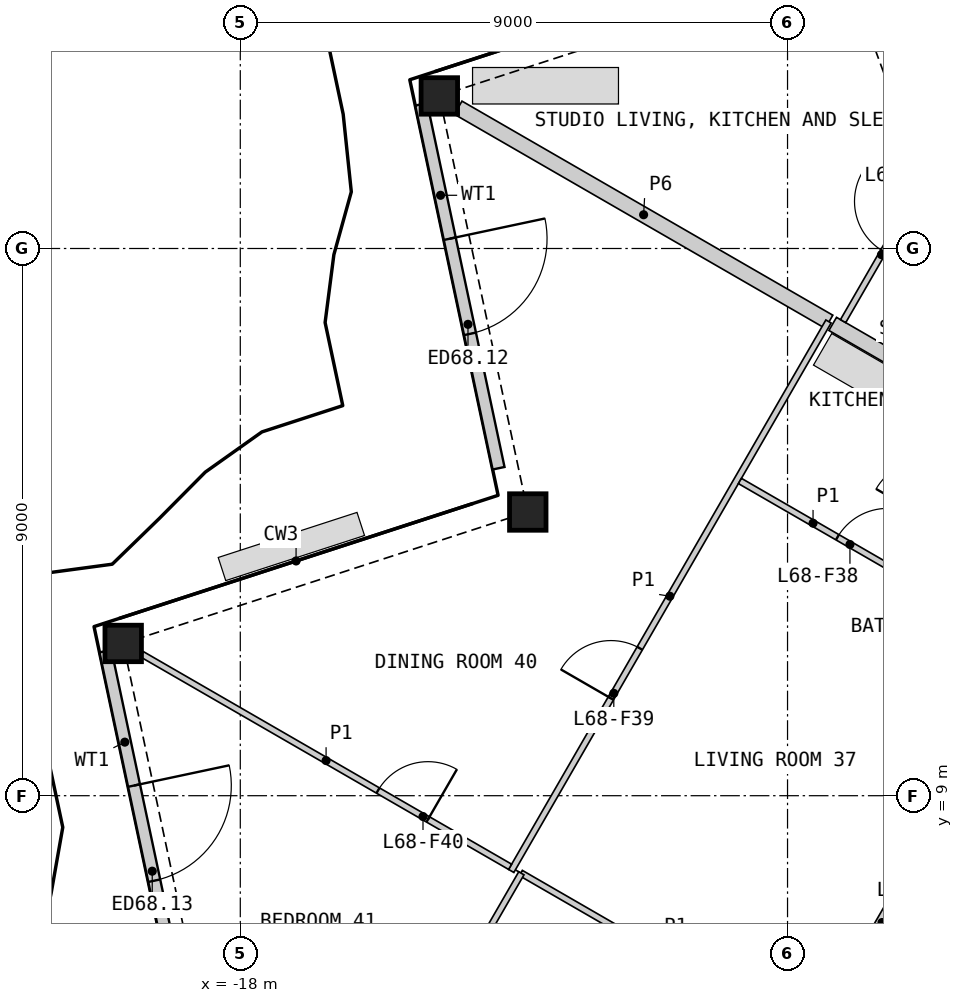
"""IFC4 building model, lengths in metres.
Left out: names, types, materials, properties, quantities, classifications, styles, units other than length and angle.
Written with IfcOpenShell. Run it as: python <this file> out.ifc"""

import sys

from ifc_helpers import new_model, si_unit, direction, frame, frame_2d, origin, origin_2d, place, context, subcontext, project, spatial, rectangle, hollow_rectangle, extrude, element, fill, save


model = new_model("IFC4")
c1 = context("Model", 3, precision=1e-05, world=origin(), true_north=direction((0.0, 1.0)))
c2 = subcontext(c1, "Body", "Model", "MODEL_VIEW")
j1 = project(units=[si_unit("LENGTHUNIT", "METRE"), si_unit("PLANEANGLEUNIT", "RADIAN")], contexts=[c1])
p1 = place(None, origin())
s1 = spatial("IfcSite", under=j1, at=p1, CompositionType="ELEMENT")
p2 = place(p1, origin())
s2 = spatial("IfcBuilding", under=s1, at=p2, CompositionType="ELEMENT")
p3 = place(p2, frame((0.0, 0.0, 312.0)))
s3 = spatial("IfcBuildingStorey", under=s2, at=p3, CompositionType="ELEMENT", Elevation=312.0)
for number, where, z_axis, x_axis in (
    (1, (-14.727, 20.509, 0.0), (0.0, 0.0, 1.0), (1.0, 0.0, 0.0)),
    (2, (-13.272, 13.666, 0.0), (0.0, 0.0, 1.0), (1.0, 0.0, 0.0)),
    (3, (-19.926, 11.504, 0.0), (0.0, 0.0, 1.0), (1.0, 0.0, 0.0)),
):
    element("IfcColumn", number, at=place(p3, frame(where, z_axis=z_axis, x_axis=x_axis)), inside=s3, PredefinedType="COLUMN", context=c2, shape_type="SweptSolid", body=[
        extrude(hollow_rectangle(XDim=0.6, YDim=0.6, WallThickness=0.04, at=origin_2d()), origin(), (0.0, 0.0, 1.0), 3.4),
    ])
p4 = place(p3, frame((-15.025, 20.372, 0.0), z_axis=(0.0, 0.0, 1.0), x_axis=(0.207932234858, -0.978143233738, 0.0)))
e4 = element("IfcWall", 4, at=p4, inside=s3, PredefinedType="SOLIDWALL", context=c2, shape_type="SweptSolid", body=[
    extrude(rectangle(XDim=6.12, YDim=0.2, at=frame_2d((3.06, 0.0))), origin(), (0.0, 0.0, 1.0), 2.488),
])
p5 = place(p4, frame((2.26, 0.0, 0.0)))
e5 = element("IfcOpeningElement", 5, at=p5, cuts=e4, PredefinedType="OPENING", context=c2, shape_type="SweptSolid", body=[
    extrude(rectangle(XDim=1.6, YDim=2.25, at=frame_2d((0.8, 1.125))), frame((0.0, 0.11, 0.0), z_axis=(0.0, -1.0, 0.0), x_axis=(1.0, 0.0, 0.0)), (0.0, 0.0, 1.0), 0.22),
])
p6 = place(p3, frame((-20.217, 11.377, 0.0), z_axis=(0.0, 0.0, 1.0), x_axis=(0.207885951908, -0.978153071354, 0.0)))
e6 = element("IfcWall", 6, at=p6, inside=s3, PredefinedType="SOLIDWALL", context=c2, shape_type="SweptSolid", body=[
    extrude(rectangle(XDim=6.12, YDim=0.2, at=frame_2d((3.06, 0.0))), origin(), (0.0, 0.0, 1.0), 2.488),
])
p7 = place(p6, frame((2.26, 0.0, 0.0)))
e7 = element("IfcOpeningElement", 7, at=p7, cuts=e6, PredefinedType="OPENING", context=c2, shape_type="SweptSolid", body=[
    extrude(rectangle(XDim=1.6, YDim=2.25, at=frame_2d((0.8, 1.125))), frame((0.0, 0.11, 0.0), z_axis=(0.0, -1.0, 0.0), x_axis=(1.0, 0.0, 0.0)), (0.0, 0.0, 1.0), 0.22),
])
p8 = place(p3, frame((-3.461, 8.417, 0.0), z_axis=(0.0, 0.0, 1.0), x_axis=(-0.50000391502, -0.866023143435, 0.0)))
e8 = element("IfcWall", 8, at=p8, inside=s3, PredefinedType="SHEAR", context=c2, shape_type="SweptSolid", body=[
    extrude(rectangle(XDim=7.759, YDim=0.6, at=frame_2d((3.879, 0.0))), origin(), (0.0, 0.0, 1.0), 3.1),
])
p9 = place(p3, frame((-8.458, 5.16, 0.0), z_axis=(0.0, 0.0, 1.0), x_axis=(0.499984266882, 0.866034487114, 0.0)))
e9 = element("IfcWall", 9, at=p9, inside=s3, PredefinedType="PARTITIONING", context=c2, shape_type="SweptSolid", body=[
    extrude(rectangle(XDim=8.099, YDim=0.2, at=frame_2d((4.049, 0.0))), origin(), (0.0, 0.0, 1.0), 3.1),
])
p10 = place(p9, frame((3.093, 0.0, 0.0)))
e10 = element("IfcOpeningElement", 10, at=p10, cuts=e9, PredefinedType="OPENING", context=c2, shape_type="SweptSolid", body=[
    extrude(rectangle(XDim=1.0, YDim=2.1, at=frame_2d((0.5, 1.05))), frame((0.0, 0.11, 0.0), z_axis=(0.0, -1.0, 0.0), x_axis=(1.0, 0.0, 0.0)), (0.0, 0.0, 1.0), 0.22),
])
p11 = place(p3, frame((-14.417, 20.316, 0.0), z_axis=(0.0, 0.0, 1.0), x_axis=(0.866022207469, -0.50000553614, 0.0)))
e11 = element("IfcWall", 11, at=p11, inside=s3, PredefinedType="PARTITIONING", context=c2, shape_type="SweptSolid", body=[
    extrude(rectangle(XDim=7.042, YDim=0.25, at=frame_2d((3.521, 0.0))), origin(), (0.0, 0.0, 1.0), 2.33),
])
p12 = place(p3, frame((-8.257, 16.76, 0.0), z_axis=(0.0, 0.0, 1.0), x_axis=(0.866034739526, -0.499983829672, 0.0)))
e12 = element("IfcWall", 12, at=p12, inside=s3, PredefinedType="PARTITIONING", context=c2, shape_type="SweptSolid", body=[
    extrude(rectangle(XDim=5.525, YDim=0.25, at=frame_2d((2.763, 0.0))), origin(), (0.0, 0.0, 1.0), 2.33),
])
p13 = place(p3, frame((-9.669, 29.144, 0.0), z_axis=(0.0, 0.0, 1.0), x_axis=(0.517770554559, -0.85551952218, 0.0)))
e13 = element("IfcWall", 13, at=p13, inside=s3, PredefinedType="PARTITIONING", context=c2, shape_type="SweptSolid", body=[
    extrude(rectangle(XDim=14.784, YDim=0.2, at=frame_2d((7.392, 0.0))), origin(), (0.0, 0.0, 1.0), 2.33),
])
p14 = place(p3, frame((-13.544, 7.762, 0.0), z_axis=(0.0, 0.0, 1.0), x_axis=(0.499993819111, 0.866028972293, 0.0)))
e14 = element("IfcWall", 14, at=p14, inside=s3, PredefinedType="PARTITIONING", context=c2, shape_type="SweptSolid", body=[
    extrude(rectangle(XDim=10.436, YDim=0.1, at=frame_2d((5.218, 0.0))), origin(), (0.0, 0.0, 1.0), 2.33),
])
p15 = place(p14, frame((3.279, 0.0, 0.0)))
e15 = element("IfcOpeningElement", 15, at=p15, cuts=e14, PredefinedType="OPENING", context=c2, shape_type="SweptSolid", body=[
    extrude(rectangle(XDim=0.95, YDim=2.1, at=frame_2d((0.475, 1.05))), frame((0.0, 0.06, 0.0), z_axis=(0.0, -1.0, 0.0), x_axis=(1.0, 0.0, 0.0)), (0.0, 0.0, 1.0), 0.12),
])
p16 = place(p3, frame((-19.615, 11.325, 0.0), z_axis=(0.0, 0.0, 1.0), x_axis=(0.866013987544, -0.500019772988, 0.0)))
e16 = element("IfcWall", 16, at=p16, inside=s3, PredefinedType="PARTITIONING", context=c2, shape_type="SweptSolid", body=[
    extrude(rectangle(XDim=6.99, YDim=0.1, at=frame_2d((3.495, 0.0))), origin(), (0.0, 0.0, 1.0), 2.33),
])
p17 = place(p16, frame((4.48, 0.0, 0.0)))
e17 = element("IfcOpeningElement", 17, at=p17, cuts=e16, PredefinedType="OPENING", context=c2, shape_type="SweptSolid", body=[
    extrude(rectangle(XDim=0.95, YDim=2.1, at=frame_2d((0.475, 1.05))), frame((0.0, 0.06, 0.0), z_axis=(0.0, -1.0, 0.0), x_axis=(1.0, 0.0, 0.0)), (0.0, 0.0, 1.0), 0.12),
])
p18 = place(p3, frame((-9.783, 14.177, 0.0), z_axis=(0.0, 0.0, 1.0), x_axis=(0.866030435321, -0.499991285022, 0.0)))
e18 = element("IfcWall", 18, at=p18, inside=s3, PredefinedType="PARTITIONING", context=c2, shape_type="SweptSolid", body=[
    extrude(rectangle(XDim=5.555, YDim=0.1, at=frame_2d((2.778, 0.0))), origin(), (0.0, 0.0, 1.0), 2.33),
])
p19 = place(p18, frame((1.852, 0.0, 0.0)))
e19 = element("IfcOpeningElement", 19, at=p19, cuts=e18, PredefinedType="OPENING", context=c2, shape_type="SweptSolid", body=[
    extrude(rectangle(XDim=0.95, YDim=2.1, at=frame_2d((0.475, 1.05))), frame((0.0, 0.06, 0.0), z_axis=(0.0, -1.0, 0.0), x_axis=(1.0, 0.0, 0.0)), (0.0, 0.0, 1.0), 0.12),
])
p20 = place(p3, frame((-13.386, 7.729, 0.0), z_axis=(0.0, 0.0, 1.0), x_axis=(0.866034036823, -0.49998504684, 0.0)))
e20 = element("IfcWall", 20, at=p20, inside=s3, PredefinedType="PARTITIONING", context=c2, shape_type="SweptSolid", body=[
    extrude(rectangle(XDim=5.312, YDim=0.1, at=frame_2d((2.656, 0.0))), origin(), (0.0, 0.0, 1.0), 2.33),
])
p21 = place(p3, frame((-15.912, 3.335, 0.0), z_axis=(0.0, 0.0, 1.0), x_axis=(0.49999906822, 0.866025941747, 0.0)))
e21 = element("IfcWall", 21, at=p21, inside=s3, PredefinedType="PARTITIONING", context=c2, shape_type="SweptSolid", body=[
    extrude(rectangle(XDim=5.068, YDim=0.1, at=frame_2d((2.534, 0.0))), origin(), (0.0, 0.0, 1.0), 2.33),
])
p22 = place(p21, frame((1.757, 0.0, 0.0)))
e22 = element("IfcOpeningElement", 22, at=p22, cuts=e21, PredefinedType="OPENING", context=c2, shape_type="SweptSolid", body=[
    extrude(rectangle(XDim=0.95, YDim=2.1, at=frame_2d((0.475, 1.05))), frame((0.0, 0.06, 0.0), z_axis=(0.0, -1.0, 0.0), x_axis=(1.0, 0.0, 0.0)), (0.0, 0.0, 1.0), 0.12),
])
p23 = place(p3, frame((-8.086, 16.805, 0.0), z_axis=(0.0, 0.0, 1.0), x_axis=(0.50001820224, 0.866014894461, 0.0)))
e23 = element("IfcWall", 23, at=p23, inside=s3, PredefinedType="PARTITIONING", context=c2, shape_type="SweptSolid", body=[
    extrude(rectangle(XDim=2.525, YDim=0.1, at=frame_2d((1.262, 0.0))), origin(), (0.0, 0.0, 1.0), 2.33),
])
p24 = place(p23, frame((1.325, 0.0, 0.0)))
e24 = element("IfcOpeningElement", 24, at=p24, cuts=e23, PredefinedType="OPENING", context=c2, shape_type="SweptSolid", body=[
    extrude(rectangle(XDim=0.95, YDim=2.1, at=frame_2d((0.475, 1.05))), frame((0.0, 0.06, 0.0), z_axis=(0.0, -1.0, 0.0), x_axis=(1.0, 0.0, 0.0)), (0.0, 0.0, 1.0), 0.12),
])
p25 = place(p5, origin())
e25 = element("IfcDoor", 25, at=p25, inside=s3, OperationType="DOUBLE_DOOR_SINGLE_SWING", PredefinedType="DOOR", context=c2, shape_type="SweptSolid", body=[
    extrude(rectangle(XDim=1.6, YDim=2.25, at=frame_2d((0.8, 1.125))), frame((0.0, 0.025, 0.0), z_axis=(0.0, -1.0, 0.0), x_axis=(1.0, 0.0, 0.0)), (0.0, 0.0, 1.0), 0.05),
])
fill(e5, e25)
p26 = place(p7, origin())
e26 = element("IfcDoor", 26, at=p26, inside=s3, OperationType="DOUBLE_DOOR_SINGLE_SWING", PredefinedType="DOOR", context=c2, shape_type="SweptSolid", body=[
    extrude(rectangle(XDim=1.6, YDim=2.25, at=frame_2d((0.8, 1.125))), frame((0.0, 0.025, 0.0), z_axis=(0.0, -1.0, 0.0), x_axis=(1.0, 0.0, 0.0)), (0.0, 0.0, 1.0), 0.05),
])
fill(e7, e26)
p27 = place(p24, origin())
e27 = element("IfcDoor", 27, at=p27, inside=s3, OperationType="SINGLE_SWING_RIGHT", PredefinedType="DOOR", context=c2, shape_type="SweptSolid", body=[
    extrude(rectangle(XDim=0.95, YDim=2.1, at=frame_2d((0.475, 1.05))), frame((0.0, 0.025, 0.0), z_axis=(0.0, -1.0, 0.0), x_axis=(1.0, 0.0, 0.0)), (0.0, 0.0, 1.0), 0.05),
])
fill(e24, e27)
p28 = place(p19, origin())
e28 = element("IfcDoor", 28, at=p28, inside=s3, OperationType="SINGLE_SWING_RIGHT", PredefinedType="DOOR", context=c2, shape_type="SweptSolid", body=[
    extrude(rectangle(XDim=0.95, YDim=2.1, at=frame_2d((0.475, 1.05))), frame((0.0, 0.025, 0.0), z_axis=(0.0, -1.0, 0.0), x_axis=(1.0, 0.0, 0.0)), (0.0, 0.0, 1.0), 0.05),
])
fill(e19, e28)
p29 = place(p15, origin())
e29 = element("IfcDoor", 29, at=p29, inside=s3, OperationType="SINGLE_SWING_LEFT", PredefinedType="DOOR", context=c2, shape_type="SweptSolid", body=[
    extrude(rectangle(XDim=0.95, YDim=2.1, at=frame_2d((0.475, 1.05))), frame((0.0, 0.025, 0.0), z_axis=(0.0, -1.0, 0.0), x_axis=(1.0, 0.0, 0.0)), (0.0, 0.0, 1.0), 0.05),
])
fill(e15, e29)
p30 = place(p17, origin())
e30 = element("IfcDoor", 30, at=p30, inside=s3, OperationType="SINGLE_SWING_RIGHT", PredefinedType="DOOR", context=c2, shape_type="SweptSolid", body=[
    extrude(rectangle(XDim=0.95, YDim=2.1, at=frame_2d((0.475, 1.05))), frame((0.0, 0.025, 0.0), z_axis=(0.0, -1.0, 0.0), x_axis=(1.0, 0.0, 0.0)), (0.0, 0.0, 1.0), 0.05),
])
fill(e17, e30)
save(model, sys.argv[1])
